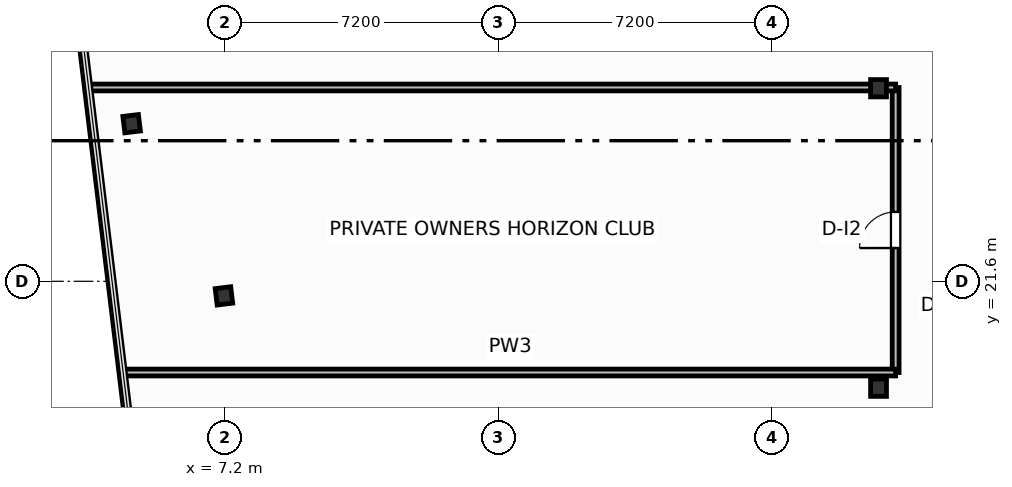
"""IFC4 building model, lengths in metres.
Left out: names, types, materials, properties, quantities, classifications, styles, units other than length and angle.
Written with IfcOpenShell. Run it as: python <this file> out.ifc"""

import sys

from ifc_helpers import new_model, si_unit, direction, frame, frame_2d, origin, origin_2d, place, context, subcontext, project, spatial, rectangle, i_section, extrude, element, fill, save


model = new_model("IFC4")
c1 = context("Model", 3, precision=1e-05, world=origin(), true_north=direction((0.0, 1.0)))
c2 = subcontext(c1, "Body", "Model", "MODEL_VIEW")
j1 = project(units=[si_unit("LENGTHUNIT", "METRE"), si_unit("PLANEANGLEUNIT", "RADIAN")], contexts=[c1])
p1 = place(None, origin())
s1 = spatial("IfcSite", under=j1, at=p1, CompositionType="ELEMENT")
p2 = place(p1, origin())
s2 = spatial("IfcBuilding", under=s1, at=p2, CompositionType="ELEMENT")
p3 = place(p2, frame((0.0, 0.0, 174.6)))
s3 = spatial("IfcBuildingStorey", under=s2, at=p3, CompositionType="ELEMENT", Elevation=174.6)
for number, where, z_axis, x_axis in (
    (1, (24.4, 18.8, 0.0), (0.0, 0.0, 1.0), (1.0, 0.0, 0.0)),
    (2, (24.4, 26.68, 0.0), (0.0, 0.0, 1.0), (1.0, 0.0, 0.0)),
):
    element("IfcColumn", number, at=place(p3, frame(where, z_axis=z_axis, x_axis=x_axis)), inside=s3, PredefinedType="COLUMN", context=c2, shape_type="SweptSolid", body=[
        extrude(i_section(OverallWidth=0.418, OverallDepth=0.455, WebThickness=0.042, FlangeThickness=0.068, FilletRadius=0.025, at=origin_2d()), origin(), (0.0, 0.0, 1.0), 3.7),
    ])
for number, where, z_axis, x_axis in (
    (3, (4.746, 25.747, 0.0), (0.0, 0.0, 1.0), (0.993, 0.12, 0.0)),
    (4, (7.175, 21.216, 0.0), (0.0, 0.0, 1.0), (0.993, 0.12, 0.0)),
):
    element("IfcColumn", number, at=place(p3, frame(where, z_axis=z_axis, x_axis=x_axis)), inside=s3, PredefinedType="COLUMN", context=c2, shape_type="SweptSolid", body=[
        extrude(i_section(OverallWidth=0.412, OverallDepth=0.435, WebThickness=0.036, FlangeThickness=0.057, FilletRadius=0.025, at=origin_2d()), origin(), (0.0, 0.0, 1.0), 3.7),
    ])
p4 = place(p3, frame((24.85, 19.2, 0.0), z_axis=(0.0, 0.0, 1.0), x_axis=(0.0, 1.0, 0.0)))
e5 = element("IfcWall", 5, at=p4, inside=s3, PredefinedType="PARTITIONING", context=c2, shape_type="SweptSolid", body=[
    extrude(rectangle(XDim=7.5, YDim=0.18, at=frame_2d((3.75, 0.0))), origin(), (0.0, 0.0, 1.0), 3.45),
])
p5 = place(p4, frame((3.275, 0.0, 0.0)))
e6 = element("IfcOpeningElement", 6, at=p5, cuts=e5, PredefinedType="OPENING", context=c2, shape_type="SweptSolid", body=[
    extrude(rectangle(XDim=0.95, YDim=2.05, at=frame_2d((0.475, 1.025))), frame((0.0, 0.1, 0.0), z_axis=(0.0, -1.0, 0.0), x_axis=(1.0, 0.0, 0.0)), (0.0, 0.0, 1.0), 0.2),
])
p6 = place(p3, frame((4.562, 19.2, 0.0), z_axis=(0.0, 0.0, 1.0), x_axis=(1.0, 0.0, 0.0)))
e7 = element("IfcWall", 7, at=p6, inside=s3, PredefinedType="PARTITIONING", context=c2, shape_type="SweptSolid", body=[
    extrude(rectangle(XDim=20.288, YDim=0.18, at=frame_2d((10.144, 0.0))), origin(), (0.0, 0.0, 1.0), 3.45),
])
p7 = place(p3, frame((3.653, 26.7, 0.0), z_axis=(0.0, 0.0, 1.0), x_axis=(1.0, 0.0, 0.0)))
e8 = element("IfcWall", 8, at=p7, inside=s3, PredefinedType="PARTITIONING", context=c2, shape_type="SweptSolid", body=[
    extrude(rectangle(XDim=21.197, YDim=0.18, at=frame_2d((10.599, 0.0))), origin(), (0.0, 0.0, 1.0), 2.662),
])
p8 = place(p5, origin())
e9 = element("IfcDoor", 9, at=p8, inside=s3, OperationType="SINGLE_SWING_LEFT", PredefinedType="DOOR", context=c2, shape_type="SweptSolid", body=[
    extrude(rectangle(XDim=0.95, YDim=2.05, at=frame_2d((0.475, 1.025))), frame((0.0, 0.025, 0.0), z_axis=(0.0, -1.0, 0.0), x_axis=(1.0, 0.0, 0.0)), (0.0, 0.0, 1.0), 0.05),
])
fill(e6, e9)
save(model, sys.argv[1])
